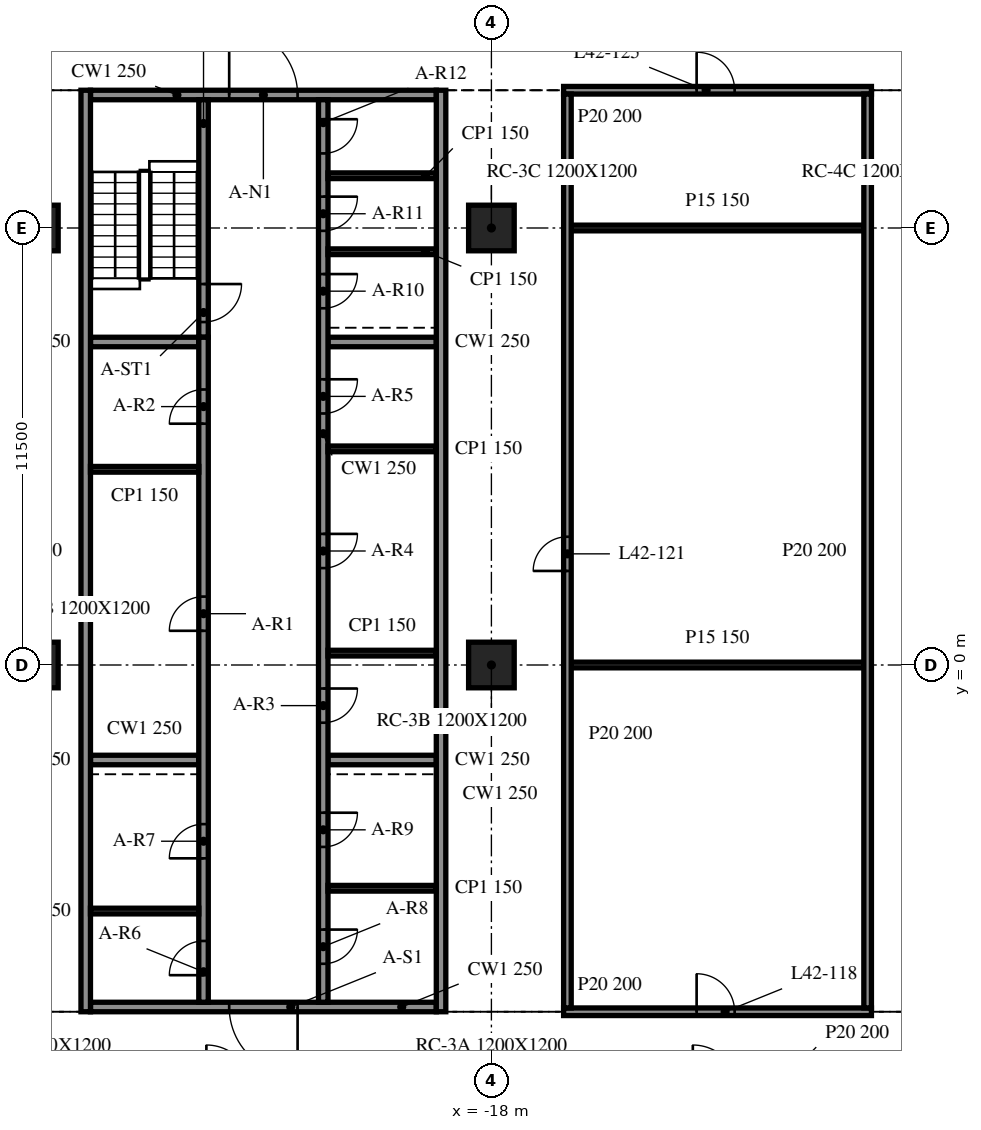
"""IFC4 building model, lengths in metres.
Left out: names, types, materials, properties, quantities, classifications, styles, units other than length and angle.
Written with IfcOpenShell. Run it as: python <this file> out.ifc"""

import sys

from ifc_helpers import new_model, si_unit, direction, frame, frame_2d, origin, origin_2d, place, context, subcontext, project, spatial, rectangle, extrude, element, fill, save


model = new_model("IFC4")
c1 = context("Model", 3, precision=1e-05, world=origin(), true_north=direction((0.0, 1.0)))
c2 = subcontext(c1, "Body", "Model", "MODEL_VIEW")
j1 = project(units=[si_unit("LENGTHUNIT", "METRE"), si_unit("PLANEANGLEUNIT", "RADIAN")], contexts=[c1])
p1 = place(None, origin())
s1 = spatial("IfcSite", under=j1, at=p1, CompositionType="ELEMENT")
p2 = place(p1, origin())
s2 = spatial("IfcBuilding", under=s1, at=p2, CompositionType="ELEMENT")
p3 = place(p2, frame((0.0, 0.0, 178.2)))
s3 = spatial("IfcBuildingStorey", under=s2, at=p3, CompositionType="ELEMENT", Elevation=178.2)
for number, where, z_axis, x_axis in (
    (1, (-30.0, 0.0, -0.34), (0.0, 0.0, 1.0), (1.0, 0.0, 0.0)),
    (2, (-30.0, 11.5, -0.34), (0.0, 0.0, 1.0), (1.0, 0.0, 0.0)),
    (3, (-18.0, 0.0, -0.34), (0.0, 0.0, 1.0), (1.0, 0.0, 0.0)),
    (4, (-18.0, 11.5, -0.34), (0.0, 0.0, 1.0), (1.0, 0.0, 0.0)),
):
    element("IfcColumn", number, at=place(p3, frame(where, z_axis=z_axis, x_axis=x_axis)), inside=s3, PredefinedType="COLUMN", context=c2, shape_type="SweptSolid", body=[
        extrude(rectangle(XDim=1.2, YDim=1.2, at=origin_2d()), origin(), (0.0, 0.0, 1.0), 3.8),
    ])
for number, where, z_axis, x_axis in (
    (5, (-28.675, 15.125, 0.0), (0.0, 0.0, 1.0), (0.0, -1.0, 0.0)),
    (6, (-19.325, -9.125, 0.0), (0.0, 0.0, 1.0), (0.0, 1.0, 0.0)),
):
    element("IfcWall", number, at=place(p3, frame(where, z_axis=z_axis, x_axis=x_axis)), inside=s3, PredefinedType="SOLIDWALL", context=c2, shape_type="SweptSolid", body=[
        extrude(rectangle(XDim=24.25, YDim=0.25, at=frame_2d((12.125, 0.0))), origin(), (0.0, 0.0, 1.0), 3.46),
    ])
p4 = place(p3, frame((-19.45, -9.0, 0.0), z_axis=(0.0, 0.0, 1.0), x_axis=(-1.0, 0.0, 0.0)))
e7 = element("IfcWall", 7, at=p4, inside=s3, PredefinedType="SOLIDWALL", context=c2, shape_type="SweptSolid", body=[
    extrude(rectangle(XDim=9.1, YDim=0.25, at=frame_2d((4.55, 0.0))), origin(), (0.0, 0.0, 1.0), 3.46),
])
p5 = place(p4, frame((3.65, 0.0, 0.0)))
e8 = element("IfcOpeningElement", 8, at=p5, cuts=e7, PredefinedType="OPENING", context=c2, shape_type="SweptSolid", body=[
    extrude(rectangle(XDim=1.8, YDim=2.1, at=frame_2d((0.9, 1.05))), frame((0.0, 0.135, 0.0), z_axis=(0.0, -1.0, 0.0), x_axis=(1.0, 0.0, 0.0)), (0.0, 0.0, 1.0), 0.27),
])
p6 = place(p3, frame((-28.55, 15.0, 0.0), z_axis=(0.0, 0.0, 1.0), x_axis=(1.0, 0.0, 0.0)))
e9 = element("IfcWall", 9, at=p6, inside=s3, PredefinedType="SOLIDWALL", context=c2, shape_type="SweptSolid", body=[
    extrude(rectangle(XDim=9.1, YDim=0.25, at=frame_2d((4.55, 0.0))), origin(), (0.0, 0.0, 1.0), 3.46),
])
p7 = place(p6, frame((3.65, 0.0, 0.0)))
e10 = element("IfcOpeningElement", 10, at=p7, cuts=e9, PredefinedType="OPENING", context=c2, shape_type="SweptSolid", body=[
    extrude(rectangle(XDim=1.8, YDim=2.1, at=frame_2d((0.9, 1.05))), frame((0.0, 0.135, 0.0), z_axis=(0.0, -1.0, 0.0), x_axis=(1.0, 0.0, 0.0)), (0.0, 0.0, 1.0), 0.27),
])
p8 = place(p3, frame((-25.575, -8.875, 0.0), z_axis=(0.0, 0.0, 1.0), x_axis=(0.0, 1.0, 0.0)))
e11 = element("IfcWall", 11, at=p8, inside=s3, PredefinedType="SOLIDWALL", context=c2, shape_type="SweptSolid", body=[
    extrude(rectangle(XDim=17.5, YDim=0.25, at=frame_2d((8.75, 0.0))), origin(), (0.0, 0.0, 1.0), 3.46),
])
p9 = place(p8, frame((9.775, 0.0, 0.0)))
e12 = element("IfcOpeningElement", 12, at=p9, cuts=e11, PredefinedType="OPENING", context=c2, shape_type="SweptSolid", body=[
    extrude(rectangle(XDim=0.9, YDim=2.1, at=frame_2d((0.45, 1.05))), frame((0.0, 0.135, 0.0), z_axis=(0.0, -1.0, 0.0), x_axis=(1.0, 0.0, 0.0)), (0.0, 0.0, 1.0), 0.27),
])
p10 = place(p8, frame((15.225, 0.0, 0.0)))
e13 = element("IfcOpeningElement", 13, at=p10, cuts=e11, PredefinedType="OPENING", context=c2, shape_type="SweptSolid", body=[
    extrude(rectangle(XDim=0.9, YDim=2.1, at=frame_2d((0.45, 1.05))), frame((0.0, 0.135, 0.0), z_axis=(0.0, -1.0, 0.0), x_axis=(1.0, 0.0, 0.0)), (0.0, 0.0, 1.0), 0.27),
])
p11 = place(p8, frame((0.712, 0.0, 0.0)))
e14 = element("IfcOpeningElement", 14, at=p11, cuts=e11, PredefinedType="OPENING", context=c2, shape_type="SweptSolid", body=[
    extrude(rectangle(XDim=0.9, YDim=2.1, at=frame_2d((0.45, 1.05))), frame((0.0, 0.135, 0.0), z_axis=(0.0, -1.0, 0.0), x_axis=(1.0, 0.0, 0.0)), (0.0, 0.0, 1.0), 0.27),
])
p12 = place(p8, frame((3.788, 0.0, 0.0)))
e15 = element("IfcOpeningElement", 15, at=p12, cuts=e11, PredefinedType="OPENING", context=c2, shape_type="SweptSolid", body=[
    extrude(rectangle(XDim=0.9, YDim=2.1, at=frame_2d((0.45, 1.05))), frame((0.0, 0.135, 0.0), z_axis=(0.0, -1.0, 0.0), x_axis=(1.0, 0.0, 0.0)), (0.0, 0.0, 1.0), 0.27),
])
p13 = place(p3, frame((-25.575, 14.875, 0.0), z_axis=(0.0, 0.0, 1.0), x_axis=(0.0, -1.0, 0.0)))
e16 = element("IfcWall", 16, at=p13, inside=s3, PredefinedType="SOLIDWALL", context=c2, shape_type="SweptSolid", body=[
    extrude(rectangle(XDim=6.25, YDim=0.25, at=frame_2d((3.125, 0.0))), origin(), (0.0, 0.0, 1.0), 3.46),
])
p14 = place(p13, frame((4.85, 0.0, 0.0)))
e17 = element("IfcOpeningElement", 17, at=p14, cuts=e16, PredefinedType="OPENING", context=c2, shape_type="SweptSolid", body=[
    extrude(rectangle(XDim=1.0, YDim=2.1, at=frame_2d((0.5, 1.05))), frame((0.0, 0.135, 0.0), z_axis=(0.0, -1.0, 0.0), x_axis=(1.0, 0.0, 0.0)), (0.0, 0.0, 1.0), 0.27),
])
p15 = place(p3, frame((-22.425, 14.875, 0.0), z_axis=(0.0, 0.0, 1.0), x_axis=(0.0, -1.0, 0.0)))
e18 = element("IfcWall", 18, at=p15, inside=s3, PredefinedType="SOLIDWALL", context=c2, shape_type="SweptSolid", body=[
    extrude(rectangle(XDim=23.75, YDim=0.25, at=frame_2d((11.875, 0.0))), origin(), (0.0, 0.0, 1.0), 3.46),
])
p16 = place(p15, frame((15.494, 0.0, 0.0)))
e19 = element("IfcOpeningElement", 19, at=p16, cuts=e18, PredefinedType="OPENING", context=c2, shape_type="SweptSolid", body=[
    extrude(rectangle(XDim=0.9, YDim=2.1, at=frame_2d((0.45, 1.05))), frame((0.0, 0.135, 0.0), z_axis=(0.0, -1.0, 0.0), x_axis=(1.0, 0.0, 0.0)), (0.0, 0.0, 1.0), 0.27),
])
p17 = place(p15, frame((11.425, 0.0, 0.0)))
e20 = element("IfcOpeningElement", 20, at=p17, cuts=e18, PredefinedType="OPENING", context=c2, shape_type="SweptSolid", body=[
    extrude(rectangle(XDim=0.9, YDim=2.1, at=frame_2d((0.45, 1.05))), frame((0.0, 0.135, 0.0), z_axis=(0.0, -1.0, 0.0), x_axis=(1.0, 0.0, 0.0)), (0.0, 0.0, 1.0), 0.27),
])
p18 = place(p15, frame((7.356, 0.0, 0.0)))
e21 = element("IfcOpeningElement", 21, at=p18, cuts=e18, PredefinedType="OPENING", context=c2, shape_type="SweptSolid", body=[
    extrude(rectangle(XDim=0.9, YDim=2.1, at=frame_2d((0.45, 1.05))), frame((0.0, 0.135, 0.0), z_axis=(0.0, -1.0, 0.0), x_axis=(1.0, 0.0, 0.0)), (0.0, 0.0, 1.0), 0.27),
])
p19 = place(p15, frame((21.837, 0.0, 0.0)))
e22 = element("IfcOpeningElement", 22, at=p19, cuts=e18, PredefinedType="OPENING", context=c2, shape_type="SweptSolid", body=[
    extrude(rectangle(XDim=0.9, YDim=2.1, at=frame_2d((0.45, 1.05))), frame((0.0, 0.135, 0.0), z_axis=(0.0, -1.0, 0.0), x_axis=(1.0, 0.0, 0.0)), (0.0, 0.0, 1.0), 0.27),
])
p20 = place(p15, frame((18.762, 0.0, 0.0)))
e23 = element("IfcOpeningElement", 23, at=p20, cuts=e18, PredefinedType="OPENING", context=c2, shape_type="SweptSolid", body=[
    extrude(rectangle(XDim=0.9, YDim=2.1, at=frame_2d((0.45, 1.05))), frame((0.0, 0.135, 0.0), z_axis=(0.0, -1.0, 0.0), x_axis=(1.0, 0.0, 0.0)), (0.0, 0.0, 1.0), 0.27),
])
p21 = place(p15, frame((4.587, 0.0, 0.0)))
e24 = element("IfcOpeningElement", 24, at=p21, cuts=e18, PredefinedType="OPENING", context=c2, shape_type="SweptSolid", body=[
    extrude(rectangle(XDim=0.9, YDim=2.1, at=frame_2d((0.45, 1.05))), frame((0.0, 0.135, 0.0), z_axis=(0.0, -1.0, 0.0), x_axis=(1.0, 0.0, 0.0)), (0.0, 0.0, 1.0), 0.27),
])
p22 = place(p15, frame((2.55, 0.0, 0.0)))
e25 = element("IfcOpeningElement", 25, at=p22, cuts=e18, PredefinedType="OPENING", context=c2, shape_type="SweptSolid", body=[
    extrude(rectangle(XDim=0.9, YDim=2.1, at=frame_2d((0.45, 1.05))), frame((0.0, 0.135, 0.0), z_axis=(0.0, -1.0, 0.0), x_axis=(1.0, 0.0, 0.0)), (0.0, 0.0, 1.0), 0.27),
])
p23 = place(p15, frame((0.512, 0.0, 0.0)))
e26 = element("IfcOpeningElement", 26, at=p23, cuts=e18, PredefinedType="OPENING", context=c2, shape_type="SweptSolid", body=[
    extrude(rectangle(XDim=0.9, YDim=2.1, at=frame_2d((0.45, 1.05))), frame((0.0, 0.135, 0.0), z_axis=(0.0, -1.0, 0.0), x_axis=(1.0, 0.0, 0.0)), (0.0, 0.0, 1.0), 0.27),
])
for number, where, z_axis, x_axis in (
    (27, (-28.55, -2.5, 0.0), (0.0, 0.0, 1.0), (1.0, 0.0, 0.0)),
    (28, (-28.55, 8.5, 0.0), (0.0, 0.0, 1.0), (1.0, 0.0, 0.0)),
    (29, (-22.3, -2.5, 0.0), (0.0, 0.0, 1.0), (1.0, 0.0, 0.0)),
    (30, (-22.3, 8.5, 0.0), (0.0, 0.0, 1.0), (1.0, 0.0, 0.0)),
):
    element("IfcWall", number, at=place(p3, frame(where, z_axis=z_axis, x_axis=x_axis)), inside=s3, PredefinedType="SOLIDWALL", context=c2, shape_type="SweptSolid", body=[
        extrude(rectangle(XDim=2.85, YDim=0.25, at=frame_2d((1.425, 0.0))), origin(), (0.0, 0.0, 1.0), 3.46),
    ])
for number, where, z_axis, x_axis in (
    (31, (-28.55, 5.15, 0.0), (0.0, 0.0, 1.0), (1.0, 0.0, 0.0)),
    (32, (-22.3, 0.312, 0.0), (0.0, 0.0, 1.0), (1.0, 0.0, 0.0)),
    (33, (-22.3, 5.688, 0.0), (0.0, 0.0, 1.0), (1.0, 0.0, 0.0)),
    (34, (-28.55, -6.475, 0.0), (0.0, 0.0, 1.0), (1.0, 0.0, 0.0)),
    (35, (-22.3, -5.875, 0.0), (0.0, 0.0, 1.0), (1.0, 0.0, 0.0)),
    (36, (-22.3, 10.875, 0.0), (0.0, 0.0, 1.0), (1.0, 0.0, 0.0)),
    (37, (-22.3, 12.875, 0.0), (0.0, 0.0, 1.0), (1.0, 0.0, 0.0)),
):
    element("IfcWall", number, at=place(p3, frame(where, z_axis=z_axis, x_axis=x_axis)), inside=s3, PredefinedType="PARTITIONING", context=c2, shape_type="SweptSolid", body=[
        extrude(rectangle(XDim=2.85, YDim=0.15, at=frame_2d((1.425, 0.0))), origin(), (0.0, 0.0, 1.0), 3.46),
    ])
p24 = place(p3, frame((-16.1, -9.125, 0.0), z_axis=(0.0, 0.0, 1.0), x_axis=(1.0, 0.0, 0.0)))
e38 = element("IfcWall", 38, at=p24, inside=s3, PredefinedType="PARTITIONING", context=c2, shape_type="SweptSolid", body=[
    extrude(rectangle(XDim=8.1, YDim=0.2, at=frame_2d((4.05, 0.0))), origin(), (0.0, 0.0, 1.0), 3.46),
])
p25 = place(p24, frame((3.5, 0.0, 0.0)))
e39 = element("IfcOpeningElement", 39, at=p25, cuts=e38, PredefinedType="OPENING", context=c2, shape_type="SweptSolid", body=[
    extrude(rectangle(XDim=1.0, YDim=2.1, at=frame_2d((0.5, 1.05))), frame((0.0, 0.11, 0.0), z_axis=(0.0, -1.0, 0.0), x_axis=(1.0, 0.0, 0.0)), (0.0, 0.0, 1.0), 0.22),
])
for number, where, z_axis, x_axis in (
    (40, (-15.9, 0.0, 0.0), (0.0, 0.0, 1.0), (1.0, 0.0, 0.0)),
    (41, (-15.9, 11.5, 0.0), (0.0, 0.0, 1.0), (1.0, 0.0, 0.0)),
):
    element("IfcWall", number, at=place(p3, frame(where, z_axis=z_axis, x_axis=x_axis)), inside=s3, PredefinedType="PARTITIONING", context=c2, shape_type="SweptSolid", body=[
        extrude(rectangle(XDim=7.7, YDim=0.15, at=frame_2d((3.85, 0.0))), origin(), (0.0, 0.0, 1.0), 3.46),
    ])
p26 = place(p3, frame((-16.1, 15.125, 0.0), z_axis=(0.0, 0.0, 1.0), x_axis=(1.0, 0.0, 0.0)))
e42 = element("IfcWall", 42, at=p26, inside=s3, PredefinedType="PARTITIONING", context=c2, shape_type="SweptSolid", body=[
    extrude(rectangle(XDim=8.1, YDim=0.2, at=frame_2d((4.05, 0.0))), origin(), (0.0, 0.0, 1.0), 3.46),
])
p27 = place(p26, frame((3.5, 0.0, 0.0)))
e43 = element("IfcOpeningElement", 43, at=p27, cuts=e42, PredefinedType="OPENING", context=c2, shape_type="SweptSolid", body=[
    extrude(rectangle(XDim=1.0, YDim=2.1, at=frame_2d((0.5, 1.05))), frame((0.0, 0.11, 0.0), z_axis=(0.0, -1.0, 0.0), x_axis=(1.0, 0.0, 0.0)), (0.0, 0.0, 1.0), 0.22),
])
p28 = place(p3, frame((-16.0, -9.025, 0.0), z_axis=(0.0, 0.0, 1.0), x_axis=(0.0, 1.0, 0.0)))
e44 = element("IfcWall", 44, at=p28, inside=s3, PredefinedType="PARTITIONING", context=c2, shape_type="SweptSolid", body=[
    extrude(rectangle(XDim=24.05, YDim=0.2, at=frame_2d((12.025, 0.0))), origin(), (0.0, 0.0, 1.0), 3.46),
])
p29 = place(p28, frame((11.5, 0.0, 0.0)))
e45 = element("IfcOpeningElement", 45, at=p29, cuts=e44, PredefinedType="OPENING", context=c2, shape_type="SweptSolid", body=[
    extrude(rectangle(XDim=0.9, YDim=2.1, at=frame_2d((0.45, 1.05))), frame((0.0, 0.11, 0.0), z_axis=(0.0, -1.0, 0.0), x_axis=(1.0, 0.0, 0.0)), (0.0, 0.0, 1.0), 0.22),
])
p30 = place(p3, frame((-8.1, -9.025, 0.0), z_axis=(0.0, 0.0, 1.0), x_axis=(0.0, 1.0, 0.0)))
e46 = element("IfcWall", 46, at=p30, inside=s3, PredefinedType="PARTITIONING", context=c2, shape_type="SweptSolid", body=[
    extrude(rectangle(XDim=24.05, YDim=0.2, at=frame_2d((12.025, 0.0))), origin(), (0.0, 0.0, 1.0), 3.46),
])
p31 = place(p5, origin())
e47 = element("IfcDoor", 47, at=p31, inside=s3, OperationType="DOUBLE_DOOR_SINGLE_SWING", PredefinedType="DOOR", context=c2, shape_type="SweptSolid", body=[
    extrude(rectangle(XDim=1.8, YDim=2.1, at=frame_2d((0.9, 1.05))), frame((0.0, 0.025, 0.0), z_axis=(0.0, -1.0, 0.0), x_axis=(1.0, 0.0, 0.0)), (0.0, 0.0, 1.0), 0.05),
])
fill(e8, e47)
p32 = place(p7, origin())
e48 = element("IfcDoor", 48, at=p32, inside=s3, OperationType="DOUBLE_DOOR_SINGLE_SWING", PredefinedType="DOOR", context=c2, shape_type="SweptSolid", body=[
    extrude(rectangle(XDim=1.8, YDim=2.1, at=frame_2d((0.9, 1.05))), frame((0.0, 0.025, 0.0), z_axis=(0.0, -1.0, 0.0), x_axis=(1.0, 0.0, 0.0)), (0.0, 0.0, 1.0), 0.05),
])
fill(e10, e48)
p33 = place(p9, origin())
e49 = element("IfcDoor", 49, at=p33, inside=s3, OperationType="SINGLE_SWING_LEFT", PredefinedType="DOOR", context=c2, shape_type="SweptSolid", body=[
    extrude(rectangle(XDim=0.9, YDim=2.1, at=frame_2d((0.45, 1.05))), frame((0.0, 0.025, 0.0), z_axis=(0.0, -1.0, 0.0), x_axis=(1.0, 0.0, 0.0)), (0.0, 0.0, 1.0), 0.05),
])
fill(e12, e49)
p34 = place(p10, origin())
e50 = element("IfcDoor", 50, at=p34, inside=s3, OperationType="SINGLE_SWING_RIGHT", PredefinedType="DOOR", context=c2, shape_type="SweptSolid", body=[
    extrude(rectangle(XDim=0.9, YDim=2.1, at=frame_2d((0.45, 1.05))), frame((0.0, 0.025, 0.0), z_axis=(0.0, -1.0, 0.0), x_axis=(1.0, 0.0, 0.0)), (0.0, 0.0, 1.0), 0.05),
])
fill(e13, e50)
p35 = place(p16, origin())
e51 = element("IfcDoor", 51, at=p35, inside=s3, OperationType="SINGLE_SWING_LEFT", PredefinedType="DOOR", context=c2, shape_type="SweptSolid", body=[
    extrude(rectangle(XDim=0.9, YDim=2.1, at=frame_2d((0.45, 1.05))), frame((0.0, 0.025, 0.0), z_axis=(0.0, -1.0, 0.0), x_axis=(1.0, 0.0, 0.0)), (0.0, 0.0, 1.0), 0.05),
])
fill(e19, e51)
p36 = place(p17, origin())
e52 = element("IfcDoor", 52, at=p36, inside=s3, OperationType="SINGLE_SWING_RIGHT", PredefinedType="DOOR", context=c2, shape_type="SweptSolid", body=[
    extrude(rectangle(XDim=0.9, YDim=2.1, at=frame_2d((0.45, 1.05))), frame((0.0, 0.025, 0.0), z_axis=(0.0, -1.0, 0.0), x_axis=(1.0, 0.0, 0.0)), (0.0, 0.0, 1.0), 0.05),
])
fill(e20, e52)
p37 = place(p18, origin())
e53 = element("IfcDoor", 53, at=p37, inside=s3, OperationType="SINGLE_SWING_LEFT", PredefinedType="DOOR", context=c2, shape_type="SweptSolid", body=[
    extrude(rectangle(XDim=0.9, YDim=2.1, at=frame_2d((0.45, 1.05))), frame((0.0, 0.025, 0.0), z_axis=(0.0, -1.0, 0.0), x_axis=(1.0, 0.0, 0.0)), (0.0, 0.0, 1.0), 0.05),
])
fill(e21, e53)
p38 = place(p11, origin())
e54 = element("IfcDoor", 54, at=p38, inside=s3, OperationType="SINGLE_SWING_RIGHT", PredefinedType="DOOR", context=c2, shape_type="SweptSolid", body=[
    extrude(rectangle(XDim=0.9, YDim=2.1, at=frame_2d((0.45, 1.05))), frame((0.0, 0.025, 0.0), z_axis=(0.0, -1.0, 0.0), x_axis=(1.0, 0.0, 0.0)), (0.0, 0.0, 1.0), 0.05),
])
fill(e14, e54)
p39 = place(p12, origin())
e55 = element("IfcDoor", 55, at=p39, inside=s3, OperationType="SINGLE_SWING_LEFT", PredefinedType="DOOR", context=c2, shape_type="SweptSolid", body=[
    extrude(rectangle(XDim=0.9, YDim=2.1, at=frame_2d((0.45, 1.05))), frame((0.0, 0.025, 0.0), z_axis=(0.0, -1.0, 0.0), x_axis=(1.0, 0.0, 0.0)), (0.0, 0.0, 1.0), 0.05),
])
fill(e15, e55)
p40 = place(p19, origin())
e56 = element("IfcDoor", 56, at=p40, inside=s3, OperationType="SINGLE_SWING_RIGHT", PredefinedType="DOOR", context=c2, shape_type="SweptSolid", body=[
    extrude(rectangle(XDim=0.9, YDim=2.1, at=frame_2d((0.45, 1.05))), frame((0.0, 0.025, 0.0), z_axis=(0.0, -1.0, 0.0), x_axis=(1.0, 0.0, 0.0)), (0.0, 0.0, 1.0), 0.05),
])
fill(e22, e56)
p41 = place(p20, origin())
e57 = element("IfcDoor", 57, at=p41, inside=s3, OperationType="SINGLE_SWING_LEFT", PredefinedType="DOOR", context=c2, shape_type="SweptSolid", body=[
    extrude(rectangle(XDim=0.9, YDim=2.1, at=frame_2d((0.45, 1.05))), frame((0.0, 0.025, 0.0), z_axis=(0.0, -1.0, 0.0), x_axis=(1.0, 0.0, 0.0)), (0.0, 0.0, 1.0), 0.05),
])
fill(e23, e57)
p42 = place(p21, origin())
e58 = element("IfcDoor", 58, at=p42, inside=s3, OperationType="SINGLE_SWING_RIGHT", PredefinedType="DOOR", context=c2, shape_type="SweptSolid", body=[
    extrude(rectangle(XDim=0.9, YDim=2.1, at=frame_2d((0.45, 1.05))), frame((0.0, 0.025, 0.0), z_axis=(0.0, -1.0, 0.0), x_axis=(1.0, 0.0, 0.0)), (0.0, 0.0, 1.0), 0.05),
])
fill(e24, e58)
p43 = place(p22, origin())
e59 = element("IfcDoor", 59, at=p43, inside=s3, OperationType="SINGLE_SWING_LEFT", PredefinedType="DOOR", context=c2, shape_type="SweptSolid", body=[
    extrude(rectangle(XDim=0.9, YDim=2.1, at=frame_2d((0.45, 1.05))), frame((0.0, 0.025, 0.0), z_axis=(0.0, -1.0, 0.0), x_axis=(1.0, 0.0, 0.0)), (0.0, 0.0, 1.0), 0.05),
])
fill(e25, e59)
p44 = place(p23, origin())
e60 = element("IfcDoor", 60, at=p44, inside=s3, OperationType="SINGLE_SWING_RIGHT", PredefinedType="DOOR", context=c2, shape_type="SweptSolid", body=[
    extrude(rectangle(XDim=0.9, YDim=2.1, at=frame_2d((0.45, 1.05))), frame((0.0, 0.025, 0.0), z_axis=(0.0, -1.0, 0.0), x_axis=(1.0, 0.0, 0.0)), (0.0, 0.0, 1.0), 0.05),
])
fill(e26, e60)
p45 = place(p14, origin())
e61 = element("IfcDoor", 61, at=p45, inside=s3, OperationType="SINGLE_SWING_LEFT", PredefinedType="DOOR", context=c2, shape_type="SweptSolid", body=[
    extrude(rectangle(XDim=1.0, YDim=2.1, at=frame_2d((0.5, 1.05))), frame((0.0, 0.025, 0.0), z_axis=(0.0, -1.0, 0.0), x_axis=(1.0, 0.0, 0.0)), (0.0, 0.0, 1.0), 0.05),
])
fill(e17, e61)
p46 = place(p25, origin())
e62 = element("IfcDoor", 62, at=p46, inside=s3, OperationType="SINGLE_SWING_LEFT", PredefinedType="DOOR", context=c2, shape_type="SweptSolid", body=[
    extrude(rectangle(XDim=1.0, YDim=2.1, at=frame_2d((0.5, 1.05))), frame((0.0, 0.025, 0.0), z_axis=(0.0, -1.0, 0.0), x_axis=(1.0, 0.0, 0.0)), (0.0, 0.0, 1.0), 0.05),
])
fill(e39, e62)
p47 = place(p29, origin())
e63 = element("IfcDoor", 63, at=p47, inside=s3, OperationType="SINGLE_SWING_RIGHT", PredefinedType="DOOR", context=c2, shape_type="SweptSolid", body=[
    extrude(rectangle(XDim=0.9, YDim=2.1, at=frame_2d((0.45, 1.05))), frame((0.0, 0.025, 0.0), z_axis=(0.0, -1.0, 0.0), x_axis=(1.0, 0.0, 0.0)), (0.0, 0.0, 1.0), 0.05),
])
fill(e45, e63)
p48 = place(p27, origin())
e64 = element("IfcDoor", 64, at=p48, inside=s3, OperationType="SINGLE_SWING_RIGHT", PredefinedType="DOOR", context=c2, shape_type="SweptSolid", body=[
    extrude(rectangle(XDim=1.0, YDim=2.1, at=frame_2d((0.5, 1.05))), frame((0.0, 0.025, 0.0), z_axis=(0.0, -1.0, 0.0), x_axis=(1.0, 0.0, 0.0)), (0.0, 0.0, 1.0), 0.05),
])
fill(e43, e64)
save(model, sys.argv[1])
